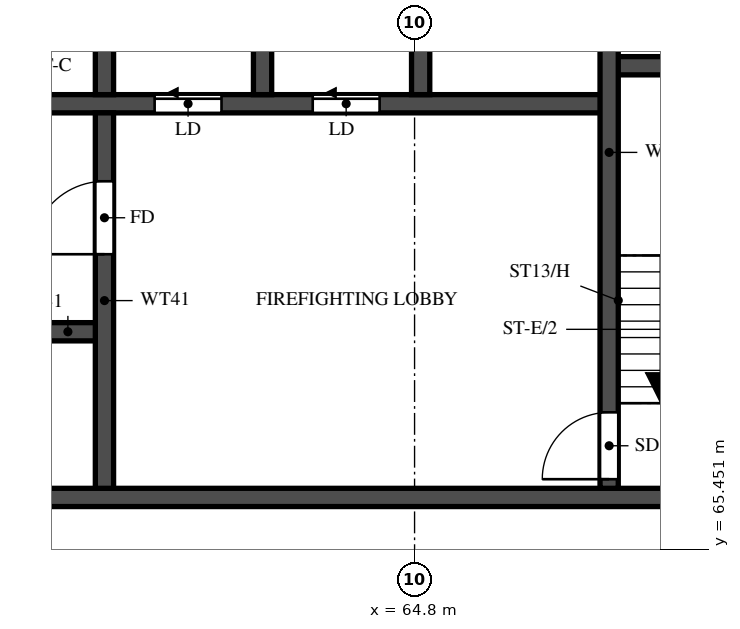
"""IFC4 building model, lengths in metres.
Left out: names, types, materials, properties, quantities, classifications, styles, units other than length and angle.
Written with IfcOpenShell. Run it as: python <this file> out.ifc"""

import sys

from ifc_helpers import new_model, si_unit, direction, frame, frame_2d, origin, place, context, subcontext, project, spatial, rectangle, extrude, element, fill, save


model = new_model("IFC4")
c1 = context("Model", 3, precision=1e-05, world=origin(), true_north=direction((0.0, 1.0)))
c2 = subcontext(c1, "Body", "Model", "MODEL_VIEW")
j1 = project(units=[si_unit("LENGTHUNIT", "METRE"), si_unit("PLANEANGLEUNIT", "RADIAN")], contexts=[c1])
p1 = place(None, origin())
s1 = spatial("IfcSite", under=j1, at=p1, CompositionType="ELEMENT")
p2 = place(p1, origin())
s2 = spatial("IfcBuilding", under=s1, at=p2, CompositionType="ELEMENT")
p3 = place(p2, frame((0.0, 0.0, 271.0)))
s3 = spatial("IfcBuildingStorey", under=s2, at=p3, CompositionType="ELEMENT", Elevation=271.0)
p4 = place(p3, frame((29.2, 66.3, 0.0), z_axis=(0.0, 0.0, 1.0), x_axis=(1.0, 0.0, 0.0)))
e1 = element("IfcWall", 1, at=p4, inside=s3, PredefinedType="SHEAR", context=c2, shape_type="SweptSolid", body=[
    extrude(rectangle(XDim=42.4, YDim=0.3, at=frame_2d((21.2, 0.0))), origin(), (0.0, 0.0, 1.0), 3.15),
])
p5 = place(p4, frame((1.425, 0.0, 0.0)))
e2 = element("IfcOpeningElement", 2, at=p5, cuts=e1, PredefinedType="OPENING", context=c2, shape_type="SweptSolid", body=[
    extrude(rectangle(XDim=1.1, YDim=2.1, at=frame_2d((0.55, 1.05))), frame((0.0, 0.16, 0.0), z_axis=(0.0, -1.0, 0.0), x_axis=(1.0, 0.0, 0.0)), (0.0, 0.0, 1.0), 0.32),
])
p6 = place(p4, frame((4.2, 0.0, 0.0)))
e3 = element("IfcOpeningElement", 3, at=p6, cuts=e1, PredefinedType="OPENING", context=c2, shape_type="SweptSolid", body=[
    extrude(rectangle(XDim=1.8, YDim=2.1, at=frame_2d((0.9, 1.05))), frame((0.0, 0.16, 0.0), z_axis=(0.0, -1.0, 0.0), x_axis=(1.0, 0.0, 0.0)), (0.0, 0.0, 1.0), 0.32),
])
p7 = place(p3, frame((35.65, 69.025, 0.0), z_axis=(0.0, 0.0, 1.0), x_axis=(1.0, 0.0, 0.0)))
e4 = element("IfcWall", 4, at=p7, inside=s3, PredefinedType="SHEAR", context=c2, shape_type="SweptSolid", body=[
    extrude(rectangle(XDim=24.05, YDim=0.3, at=frame_2d((12.025, 0.0))), origin(), (0.0, 0.0, 1.0), 3.15),
])
p8 = place(p7, frame((0.975, 0.0, 0.0)))
e5 = element("IfcOpeningElement", 5, at=p8, cuts=e4, PredefinedType="OPENING", context=c2, shape_type="SweptSolid", body=[
    extrude(rectangle(XDim=1.1, YDim=2.1, at=frame_2d((0.55, 1.05))), frame((0.0, 0.16, 0.0), z_axis=(0.0, -1.0, 0.0), x_axis=(1.0, 0.0, 0.0)), (0.0, 0.0, 1.0), 0.32),
])
p9 = place(p7, frame((3.725, 0.0, 0.0)))
e6 = element("IfcOpeningElement", 6, at=p9, cuts=e4, PredefinedType="OPENING", context=c2, shape_type="SweptSolid", body=[
    extrude(rectangle(XDim=1.1, YDim=2.1, at=frame_2d((0.55, 1.05))), frame((0.0, 0.16, 0.0), z_axis=(0.0, -1.0, 0.0), x_axis=(1.0, 0.0, 0.0)), (0.0, 0.0, 1.0), 0.32),
])
p10 = place(p7, frame((6.475, 0.0, 0.0)))
e7 = element("IfcOpeningElement", 7, at=p10, cuts=e4, PredefinedType="OPENING", context=c2, shape_type="SweptSolid", body=[
    extrude(rectangle(XDim=1.1, YDim=2.1, at=frame_2d((0.55, 1.05))), frame((0.0, 0.16, 0.0), z_axis=(0.0, -1.0, 0.0), x_axis=(1.0, 0.0, 0.0)), (0.0, 0.0, 1.0), 0.32),
])
p11 = place(p7, frame((9.225, 0.0, 0.0)))
e8 = element("IfcOpeningElement", 8, at=p11, cuts=e4, PredefinedType="OPENING", context=c2, shape_type="SweptSolid", body=[
    extrude(rectangle(XDim=1.1, YDim=2.1, at=frame_2d((0.55, 1.05))), frame((0.0, 0.16, 0.0), z_axis=(0.0, -1.0, 0.0), x_axis=(1.0, 0.0, 0.0)), (0.0, 0.0, 1.0), 0.32),
])
p12 = place(p7, frame((11.975, 0.0, 0.0)))
e9 = element("IfcOpeningElement", 9, at=p12, cuts=e4, PredefinedType="OPENING", context=c2, shape_type="SweptSolid", body=[
    extrude(rectangle(XDim=1.1, YDim=2.1, at=frame_2d((0.55, 1.05))), frame((0.0, 0.16, 0.0), z_axis=(0.0, -1.0, 0.0), x_axis=(1.0, 0.0, 0.0)), (0.0, 0.0, 1.0), 0.32),
])
p13 = place(p7, frame((14.725, 0.0, 0.0)))
e10 = element("IfcOpeningElement", 10, at=p13, cuts=e4, PredefinedType="OPENING", context=c2, shape_type="SweptSolid", body=[
    extrude(rectangle(XDim=1.1, YDim=2.1, at=frame_2d((0.55, 1.05))), frame((0.0, 0.16, 0.0), z_axis=(0.0, -1.0, 0.0), x_axis=(1.0, 0.0, 0.0)), (0.0, 0.0, 1.0), 0.32),
])
p14 = place(p7, frame((17.6, 0.0, 0.0)))
e11 = element("IfcOpeningElement", 11, at=p14, cuts=e4, PredefinedType="OPENING", context=c2, shape_type="SweptSolid", body=[
    extrude(rectangle(XDim=1.1, YDim=2.1, at=frame_2d((0.55, 1.05))), frame((0.0, 0.16, 0.0), z_axis=(0.0, -1.0, 0.0), x_axis=(1.0, 0.0, 0.0)), (0.0, 0.0, 1.0), 0.32),
])
p15 = place(p7, frame((20.6, 0.0, 0.0)))
e12 = element("IfcOpeningElement", 12, at=p15, cuts=e4, PredefinedType="OPENING", context=c2, shape_type="SweptSolid", body=[
    extrude(rectangle(XDim=1.1, YDim=2.1, at=frame_2d((0.55, 1.05))), frame((0.0, 0.16, 0.0), z_axis=(0.0, -1.0, 0.0), x_axis=(1.0, 0.0, 0.0)), (0.0, 0.0, 1.0), 0.32),
])
p16 = place(p3, frame((32.8, 72.775, 0.0), z_axis=(0.0, 0.0, 1.0), x_axis=(1.0, 0.0, 0.0)))
e13 = element("IfcWall", 13, at=p16, inside=s3, PredefinedType="SHEAR", context=c2, shape_type="SweptSolid", body=[
    extrude(rectangle(XDim=35.2, YDim=0.3, at=frame_2d((17.6, 0.0))), origin(), (0.0, 0.0, 1.0), 3.15),
])
p17 = place(p16, frame((19.8, 0.0, 0.0)))
e14 = element("IfcOpeningElement", 14, at=p17, cuts=e13, PredefinedType="OPENING", context=c2, shape_type="SweptSolid", body=[
    extrude(rectangle(XDim=1.1, YDim=2.1, at=frame_2d((0.55, 1.05))), frame((0.0, 0.16, 0.0), z_axis=(0.0, -1.0, 0.0), x_axis=(1.0, 0.0, 0.0)), (0.0, 0.0, 1.0), 0.32),
])
p18 = place(p16, frame((27.725, 0.0, 0.0)))
e15 = element("IfcOpeningElement", 15, at=p18, cuts=e13, PredefinedType="OPENING", context=c2, shape_type="SweptSolid", body=[
    extrude(rectangle(XDim=1.1, YDim=2.1, at=frame_2d((0.55, 1.05))), frame((0.0, 0.16, 0.0), z_axis=(0.0, -1.0, 0.0), x_axis=(1.0, 0.0, 0.0)), (0.0, 0.0, 1.0), 0.32),
])
p19 = place(p16, frame((30.325, 0.0, 0.0)))
e16 = element("IfcOpeningElement", 16, at=p19, cuts=e13, PredefinedType="OPENING", context=c2, shape_type="SweptSolid", body=[
    extrude(rectangle(XDim=1.1, YDim=2.1, at=frame_2d((0.55, 1.05))), frame((0.0, 0.16, 0.0), z_axis=(0.0, -1.0, 0.0), x_axis=(1.0, 0.0, 0.0)), (0.0, 0.0, 1.0), 0.32),
])
p20 = place(p16, frame((3.825, 0.0, 0.0)))
e17 = element("IfcOpeningElement", 17, at=p20, cuts=e13, PredefinedType="OPENING", context=c2, shape_type="SweptSolid", body=[
    extrude(rectangle(XDim=1.1, YDim=2.1, at=frame_2d((0.55, 1.05))), frame((0.0, 0.16, 0.0), z_axis=(0.0, -1.0, 0.0), x_axis=(1.0, 0.0, 0.0)), (0.0, 0.0, 1.0), 0.32),
])
p21 = place(p16, frame((6.575, 0.0, 0.0)))
e18 = element("IfcOpeningElement", 18, at=p21, cuts=e13, PredefinedType="OPENING", context=c2, shape_type="SweptSolid", body=[
    extrude(rectangle(XDim=1.1, YDim=2.1, at=frame_2d((0.55, 1.05))), frame((0.0, 0.16, 0.0), z_axis=(0.0, -1.0, 0.0), x_axis=(1.0, 0.0, 0.0)), (0.0, 0.0, 1.0), 0.32),
])
p22 = place(p16, frame((9.325, 0.0, 0.0)))
e19 = element("IfcOpeningElement", 19, at=p22, cuts=e13, PredefinedType="OPENING", context=c2, shape_type="SweptSolid", body=[
    extrude(rectangle(XDim=1.1, YDim=2.1, at=frame_2d((0.55, 1.05))), frame((0.0, 0.16, 0.0), z_axis=(0.0, -1.0, 0.0), x_axis=(1.0, 0.0, 0.0)), (0.0, 0.0, 1.0), 0.32),
])
p23 = place(p16, frame((12.075, 0.0, 0.0)))
e20 = element("IfcOpeningElement", 20, at=p23, cuts=e13, PredefinedType="OPENING", context=c2, shape_type="SweptSolid", body=[
    extrude(rectangle(XDim=1.1, YDim=2.1, at=frame_2d((0.55, 1.05))), frame((0.0, 0.16, 0.0), z_axis=(0.0, -1.0, 0.0), x_axis=(1.0, 0.0, 0.0)), (0.0, 0.0, 1.0), 0.32),
])
p24 = place(p16, frame((14.825, 0.0, 0.0)))
e21 = element("IfcOpeningElement", 21, at=p24, cuts=e13, PredefinedType="OPENING", context=c2, shape_type="SweptSolid", body=[
    extrude(rectangle(XDim=1.1, YDim=2.1, at=frame_2d((0.55, 1.05))), frame((0.0, 0.16, 0.0), z_axis=(0.0, -1.0, 0.0), x_axis=(1.0, 0.0, 0.0)), (0.0, 0.0, 1.0), 0.32),
])
p25 = place(p16, frame((17.575, 0.0, 0.0)))
e22 = element("IfcOpeningElement", 22, at=p25, cuts=e13, PredefinedType="OPENING", context=c2, shape_type="SweptSolid", body=[
    extrude(rectangle(XDim=1.1, YDim=2.1, at=frame_2d((0.55, 1.05))), frame((0.0, 0.16, 0.0), z_axis=(0.0, -1.0, 0.0), x_axis=(1.0, 0.0, 0.0)), (0.0, 0.0, 1.0), 0.32),
])
p26 = place(p16, frame((0.95, 0.0, 0.0)))
e23 = element("IfcOpeningElement", 23, at=p26, cuts=e13, PredefinedType="OPENING", context=c2, shape_type="SweptSolid", body=[
    extrude(rectangle(XDim=1.1, YDim=2.1, at=frame_2d((0.55, 1.05))), frame((0.0, 0.16, 0.0), z_axis=(0.0, -1.0, 0.0), x_axis=(1.0, 0.0, 0.0)), (0.0, 0.0, 1.0), 0.32),
])
p27 = place(p3, frame((68.0, 73.4, 0.0), z_axis=(0.0, 0.0, 1.0), x_axis=(1.0, 0.0, 0.0)))
e24 = element("IfcWall", 24, at=p27, inside=s3, PredefinedType="SHEAR", context=c2, shape_type="SweptSolid", body=[
    extrude(rectangle(XDim=3.1, YDim=0.3, at=frame_2d((1.55, 0.0))), origin(), (0.0, 0.0, 1.0), 3.15),
])
p28 = place(p3, frame((68.0, 66.45, 0.0), z_axis=(0.0, 0.0, 1.0), x_axis=(0.0, 1.0, 0.0)))
e25 = element("IfcWall", 25, at=p28, inside=s3, PredefinedType="SHEAR", context=c2, shape_type="SweptSolid", body=[
    extrude(rectangle(XDim=11.05, YDim=0.3, at=frame_2d((5.525, 0.0))), origin(), (0.0, 0.0, 1.0), 3.15),
])
p29 = place(p28, frame((0.15, 0.0, 0.0)))
e26 = element("IfcOpeningElement", 26, at=p29, cuts=e25, PredefinedType="OPENING", context=c2, shape_type="SweptSolid", body=[
    extrude(rectangle(XDim=1.1, YDim=2.1, at=frame_2d((0.55, 1.05))), frame((0.0, 0.16, 0.0), z_axis=(0.0, -1.0, 0.0), x_axis=(1.0, 0.0, 0.0)), (0.0, 0.0, 1.0), 0.32),
])
p30 = place(p3, frame((59.7, 66.45, 0.0), z_axis=(0.0, 0.0, 1.0), x_axis=(0.0, 1.0, 0.0)))
e27 = element("IfcWall", 27, at=p30, inside=s3, PredefinedType="SHEAR", context=c2, shape_type="SweptSolid", body=[
    extrude(rectangle(XDim=6.175, YDim=0.3, at=frame_2d((3.087, 0.0))), origin(), (0.0, 0.0, 1.0), 3.15),
])
p31 = place(p30, frame((3.85, 0.0, 0.0)))
e28 = element("IfcOpeningElement", 28, at=p31, cuts=e27, PredefinedType="OPENING", context=c2, shape_type="SweptSolid", body=[
    extrude(rectangle(XDim=1.2, YDim=2.1, at=frame_2d((0.6, 1.05))), frame((0.0, 0.16, 0.0), z_axis=(0.0, -1.0, 0.0), x_axis=(1.0, 0.0, 0.0)), (0.0, 0.0, 1.0), 0.32),
])
for number, where, z_axis, x_axis in (
    (29, (59.7, 72.925, 0.0), (0.0, 0.0, 1.0), (0.0, 1.0, 0.0)),
    (30, (62.3, 72.925, 0.0), (0.0, 0.0, 1.0), (0.0, 1.0, 0.0)),
    (31, (64.9, 72.925, 0.0), (0.0, 0.0, 1.0), (0.0, 1.0, 0.0)),
):
    element("IfcWall", number, at=place(p3, frame(where, z_axis=z_axis, x_axis=x_axis)), inside=s3, PredefinedType="SHEAR", context=c2, shape_type="SweptSolid", body=[
        extrude(rectangle(XDim=2.95, YDim=0.3, at=frame_2d((1.475, 0.0))), origin(), (0.0, 0.0, 1.0), 3.15),
    ])
p32 = place(p29, origin())
e32 = element("IfcDoor", 32, at=p32, inside=s3, OperationType="SINGLE_SWING_RIGHT", PredefinedType="DOOR", context=c2, shape_type="SweptSolid", body=[
    extrude(rectangle(XDim=1.1, YDim=2.1, at=frame_2d((0.55, 1.05))), frame((0.0, 0.025, 0.0), z_axis=(0.0, -1.0, 0.0), x_axis=(1.0, 0.0, 0.0)), (0.0, 0.0, 1.0), 0.05),
])
fill(e26, e32)
p33 = place(p31, origin())
e33 = element("IfcDoor", 33, at=p33, inside=s3, OperationType="SINGLE_SWING_LEFT", PredefinedType="DOOR", context=c2, shape_type="SweptSolid", body=[
    extrude(rectangle(XDim=1.2, YDim=2.1, at=frame_2d((0.6, 1.05))), frame((0.0, 0.025, 0.0), z_axis=(0.0, -1.0, 0.0), x_axis=(1.0, 0.0, 0.0)), (0.0, 0.0, 1.0), 0.05),
])
fill(e28, e33)
p34 = place(p18, origin())
e34 = element("IfcDoor", 34, at=p34, inside=s3, OperationType="SLIDING_TO_LEFT", PredefinedType="DOOR", context=c2, shape_type="SweptSolid", body=[
    extrude(rectangle(XDim=1.1, YDim=2.1, at=frame_2d((0.55, 1.05))), frame((0.0, 0.025, 0.0), z_axis=(0.0, -1.0, 0.0), x_axis=(1.0, 0.0, 0.0)), (0.0, 0.0, 1.0), 0.05),
])
fill(e15, e34)
p35 = place(p19, origin())
e35 = element("IfcDoor", 35, at=p35, inside=s3, OperationType="SLIDING_TO_LEFT", PredefinedType="DOOR", context=c2, shape_type="SweptSolid", body=[
    extrude(rectangle(XDim=1.1, YDim=2.1, at=frame_2d((0.55, 1.05))), frame((0.0, 0.025, 0.0), z_axis=(0.0, -1.0, 0.0), x_axis=(1.0, 0.0, 0.0)), (0.0, 0.0, 1.0), 0.05),
])
fill(e16, e35)
save(model, sys.argv[1])
